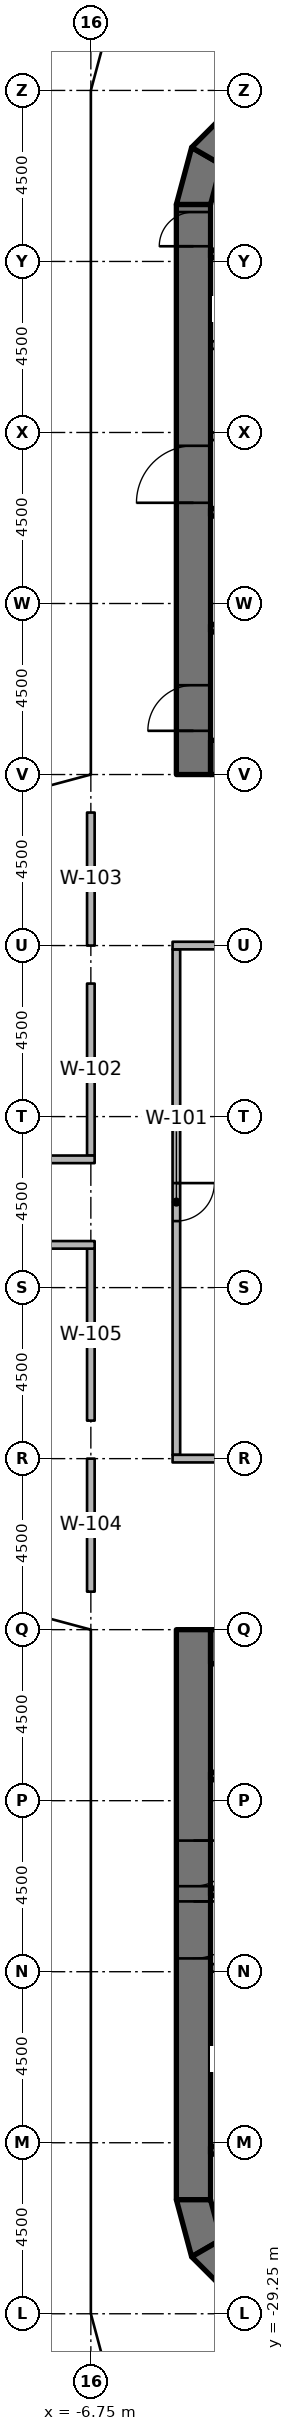
"""IFC4 building model, lengths in metres.
Left out: names, types, materials, properties, quantities, classifications, styles, units other than length and angle.
Written with IfcOpenShell. Run it as: python <this file> out.ifc"""

import sys

from ifc_helpers import new_model, si_unit, direction, frame, frame_2d, origin, origin_2d, place, context, subcontext, project, spatial, polyline, rectangle, outline, extrude, element, fill, save


model = new_model("IFC4")
c1 = context("Model", 3, precision=1e-05, world=origin(), true_north=direction((0.0, 1.0)))
c2 = subcontext(c1, "Body", "Model", "MODEL_VIEW")
j1 = project(units=[si_unit("LENGTHUNIT", "METRE"), si_unit("PLANEANGLEUNIT", "RADIAN")], contexts=[c1])
p1 = place(None, origin())
s1 = spatial("IfcSite", under=j1, at=p1, CompositionType="ELEMENT")
p2 = place(p1, origin())
s2 = spatial("IfcBuilding", under=s1, at=p2, CompositionType="ELEMENT")
p3 = place(p2, frame((0.0, 0.0, 27.0)))
s3 = spatial("IfcBuildingStorey", under=s2, at=p3, CompositionType="ELEMENT", Elevation=27.0)
for number, where, z_axis, x_axis in (
    (1, (-6.25, -26.9, 0.0), (0.0, 0.0, 1.0), (1.0, 0.0, 0.0)),
    (2, (-6.25, -24.65, 0.0), (0.0, 0.0, 1.0), (1.0, 0.0, 0.0)),
    (3, (-6.25, -20.25, 0.0), (0.0, 0.0, 1.0), (1.0, 0.0, 0.0)),
    (4, (-6.25, -15.75, 0.0), (0.0, 0.0, 1.0), (1.0, 0.0, 0.0)),
    (5, (-6.25, -10.75, 0.0), (0.0, 0.0, 1.0), (1.0, 0.0, 0.0)),
    (6, (-6.25, -6.25, 0.0), (0.0, 0.0, 1.0), (1.0, 0.0, 0.0)),
    (7, (-6.25, 6.25, 0.0), (0.0, 0.0, 1.0), (1.0, 0.0, 0.0)),
    (8, (-6.25, 10.75, 0.0), (0.0, 0.0, 1.0), (1.0, 0.0, 0.0)),
    (9, (-6.25, 15.75, 0.0), (0.0, 0.0, 1.0), (1.0, 0.0, 0.0)),
    (10, (-6.25, 20.25, 0.0), (0.0, 0.0, 1.0), (1.0, 0.0, 0.0)),
    (11, (-6.25, 24.65, 0.0), (0.0, 0.0, 1.0), (1.0, 0.0, 0.0)),
    (12, (-6.25, 26.7, 0.0), (0.0, 0.0, 1.0), (1.0, 0.0, 0.0)),
):
    element("IfcColumn", number, at=place(p3, frame(where, z_axis=z_axis, x_axis=x_axis)), inside=s3, PredefinedType="COLUMN", context=c2, shape_type="SweptSolid", body=[
        extrude(rectangle(XDim=1.0, YDim=1.0, at=origin_2d()), origin(), (0.0, 0.0, 1.0), 4.05),
    ])
p4 = place(p3, frame((-4.05, 11.25, 0.0), z_axis=(0.0, 0.0, 1.0), x_axis=(0.0, 1.0, 0.0)))
e13 = element("IfcWall", 13, at=p4, inside=s3, PredefinedType="SHEAR", context=c2, shape_type="SweptSolid", body=[
    extrude(rectangle(XDim=15.0, YDim=0.9, at=frame_2d((7.5, 0.0))), origin(), (0.0, 0.0, 1.0), 4.2),
])
p5 = place(p4, frame((7.15, 0.0, 0.0)))
e14 = element("IfcOpeningElement", 14, at=p5, cuts=e13, PredefinedType="OPENING", context=c2, shape_type="SweptSolid", body=[
    extrude(rectangle(XDim=1.5, YDim=2.3, at=frame_2d((0.75, 1.15))), frame((0.0, 0.46, 0.0), z_axis=(0.0, -1.0, 0.0), x_axis=(1.0, 0.0, 0.0)), (0.0, 0.0, 1.0), 0.92),
])
p6 = place(p4, frame((13.9, 0.0, 0.0)))
e15 = element("IfcOpeningElement", 15, at=p6, cuts=e13, PredefinedType="OPENING", context=c2, shape_type="SweptSolid", body=[
    extrude(rectangle(XDim=0.9, YDim=2.1, at=frame_2d((0.45, 1.05))), frame((0.0, 0.46, 0.0), z_axis=(0.0, -1.0, 0.0), x_axis=(1.0, 0.0, 0.0)), (0.0, 0.0, 1.0), 0.92),
])
p7 = place(p4, frame((1.15, 0.0, 0.0)))
e16 = element("IfcOpeningElement", 16, at=p7, cuts=e13, PredefinedType="OPENING", context=c2, shape_type="SweptSolid", body=[
    extrude(rectangle(XDim=1.2, YDim=2.1, at=frame_2d((0.6, 1.05))), frame((0.0, 0.46, 0.0), z_axis=(0.0, -1.0, 0.0), x_axis=(1.0, 0.0, 0.0)), (0.0, 0.0, 1.0), 0.92),
])
p8 = place(p3, frame((-3.6, 11.7, 0.0), z_axis=(0.0, 0.0, 1.0), x_axis=(1.0, 0.0, 0.0)))
e17 = element("IfcWall", 17, at=p8, inside=s3, PredefinedType="SHEAR", context=c2, shape_type="SweptSolid", body=[
    extrude(rectangle(XDim=7.2, YDim=0.9, at=frame_2d((3.6, 0.0))), origin(), (0.0, 0.0, 1.0), 4.2),
])
p9 = place(p3, origin())
e18 = element("IfcWall", 18, at=p9, inside=s3, PredefinedType="SHEAR", context=c2, shape_type="SweptSolid", body=[
    extrude(outline(polyline([(-4.5, 26.25), (-4.098, 27.75), (-3.319, 27.3), (-3.6, 26.25), (-4.5, 26.25)])), origin(), (0.0, 0.0, 1.0), 4.2),
])
p10 = place(p3, origin())
e19 = element("IfcWall", 19, at=p10, inside=s3, PredefinedType="SHEAR", context=c2, shape_type="SweptSolid", body=[
    extrude(outline(polyline([(-4.098, 27.75), (-3.0, 28.848), (-2.55, 28.069), (-3.319, 27.3), (-4.098, 27.75)])), origin(), (0.0, 0.0, 1.0), 4.2),
])
p11 = place(p3, frame((-4.05, -11.25, 0.0), z_axis=(0.0, 0.0, 1.0), x_axis=(0.0, -1.0, 0.0)))
e20 = element("IfcWall", 20, at=p11, inside=s3, PredefinedType="SHEAR", context=c2, shape_type="SweptSolid", body=[
    extrude(rectangle(XDim=15.0, YDim=0.9, at=frame_2d((7.5, 0.0))), origin(), (0.0, 0.0, 1.0), 4.2),
])
p12 = place(p11, frame((7.15, 0.0, 0.0)))
e21 = element("IfcOpeningElement", 21, at=p12, cuts=e20, PredefinedType="OPENING", context=c2, shape_type="SweptSolid", body=[
    extrude(rectangle(XDim=1.5, YDim=2.3, at=frame_2d((0.75, 1.15))), frame((0.0, 0.46, 0.0), z_axis=(0.0, -1.0, 0.0), x_axis=(1.0, 0.0, 0.0)), (0.0, 0.0, 1.0), 0.92),
])
p13 = place(p11, frame((5.55, 0.0, 0.0)))
e22 = element("IfcOpeningElement", 22, at=p13, cuts=e20, PredefinedType="OPENING", context=c2, shape_type="SweptSolid", body=[
    extrude(rectangle(XDim=1.2, YDim=2.1, at=frame_2d((0.6, 1.05))), frame((0.0, 0.46, 0.0), z_axis=(0.0, -1.0, 0.0), x_axis=(1.0, 0.0, 0.0)), (0.0, 0.0, 1.0), 0.92),
])
p14 = place(p3, frame((-3.6, -11.7, 0.0), z_axis=(0.0, 0.0, 1.0), x_axis=(1.0, 0.0, 0.0)))
e23 = element("IfcWall", 23, at=p14, inside=s3, PredefinedType="SHEAR", context=c2, shape_type="SweptSolid", body=[
    extrude(rectangle(XDim=7.2, YDim=0.9, at=frame_2d((3.6, 0.0))), origin(), (0.0, 0.0, 1.0), 4.2),
])
p15 = place(p3, origin())
e24 = element("IfcWall", 24, at=p15, inside=s3, PredefinedType="SHEAR", context=c2, shape_type="SweptSolid", body=[
    extrude(outline(polyline([(-4.5, -26.25), (-4.098, -27.75), (-3.319, -27.3), (-3.6, -26.25), (-4.5, -26.25)])), origin(), (0.0, 0.0, 1.0), 4.2),
])
p16 = place(p3, origin())
e25 = element("IfcWall", 25, at=p16, inside=s3, PredefinedType="SHEAR", context=c2, shape_type="SweptSolid", body=[
    extrude(outline(polyline([(-4.098, -27.75), (-3.0, -28.848), (-2.55, -28.069), (-3.319, -27.3), (-4.098, -27.75)])), origin(), (0.0, 0.0, 1.0), 4.2),
])
for number, where, z_axis, x_axis in (
    (26, (-3.6, 24.95, 0.0), (0.0, 0.0, 1.0), (1.0, 0.0, 0.0)),
    (27, (-3.6, 18.15, 0.0), (0.0, 0.0, 1.0), (1.0, 0.0, 0.0)),
    (28, (-3.6, 15.1, 0.0), (0.0, 0.0, 1.0), (1.0, 0.0, 0.0)),
):
    element("IfcWall", number, at=place(p3, frame(where, z_axis=z_axis, x_axis=x_axis)), inside=s3, PredefinedType="SHEAR", context=c2, shape_type="SweptSolid", body=[
        extrude(rectangle(XDim=7.2, YDim=0.2, at=frame_2d((3.6, 0.0))), origin(), (0.0, 0.0, 1.0), 4.05),
    ])
p17 = place(p3, frame((-3.6, 20.15, 0.0), z_axis=(0.0, 0.0, 1.0), x_axis=(1.0, 0.0, 0.0)))
e29 = element("IfcWall", 29, at=p17, inside=s3, PredefinedType="PARTITIONING", context=c2, shape_type="SweptSolid", body=[
    extrude(rectangle(XDim=2.7, YDim=0.2, at=frame_2d((1.35, 0.0))), origin(), (0.0, 0.0, 1.0), 4.05),
])
p18 = place(p3, frame((-3.6, 22.55, 0.0), z_axis=(0.0, 0.0, 1.0), x_axis=(1.0, 0.0, 0.0)))
e30 = element("IfcWall", 30, at=p18, inside=s3, PredefinedType="PARTITIONING", context=c2, shape_type="SweptSolid", body=[
    extrude(rectangle(XDim=2.5, YDim=0.2, at=frame_2d((1.25, 0.0))), origin(), (0.0, 0.0, 1.0), 4.05),
])
for number, where, z_axis, x_axis in (
    (31, (3.6, -24.95, 0.0), (0.0, 0.0, 1.0), (-1.0, 0.0, 0.0)),
    (32, (3.6, -18.15, 0.0), (0.0, 0.0, 1.0), (-1.0, 0.0, 0.0)),
    (33, (3.6, -15.1, 0.0), (0.0, 0.0, 1.0), (-1.0, 0.0, 0.0)),
):
    element("IfcWall", number, at=place(p3, frame(where, z_axis=z_axis, x_axis=x_axis)), inside=s3, PredefinedType="SHEAR", context=c2, shape_type="SweptSolid", body=[
        extrude(rectangle(XDim=7.2, YDim=0.2, at=frame_2d((3.6, 0.0))), origin(), (0.0, 0.0, 1.0), 4.05),
    ])
p19 = place(p3, frame((-0.9, -20.15, 0.0), z_axis=(0.0, 0.0, 1.0), x_axis=(-1.0, 0.0, 0.0)))
e34 = element("IfcWall", 34, at=p19, inside=s3, PredefinedType="PARTITIONING", context=c2, shape_type="SweptSolid", body=[
    extrude(rectangle(XDim=2.7, YDim=0.2, at=frame_2d((1.35, 0.0))), origin(), (0.0, 0.0, 1.0), 4.05),
])
p20 = place(p3, frame((-1.1, -22.55, 0.0), z_axis=(0.0, 0.0, 1.0), x_axis=(-1.0, 0.0, 0.0)))
e35 = element("IfcWall", 35, at=p20, inside=s3, PredefinedType="PARTITIONING", context=c2, shape_type="SweptSolid", body=[
    extrude(rectangle(XDim=2.5, YDim=0.2, at=frame_2d((1.25, 0.0))), origin(), (0.0, 0.0, 1.0), 4.05),
])
p21 = place(p3, frame((-4.5, 6.65, 0.0), z_axis=(0.0, 0.0, 1.0), x_axis=(0.0, -1.0, 0.0)))
e36 = element("IfcWall", 36, at=p21, inside=s3, PredefinedType="PARTITIONING", context=c2, shape_type="SweptSolid", body=[
    extrude(rectangle(XDim=13.3, YDim=0.2, at=frame_2d((6.65, 0.0))), origin(), (0.0, 0.0, 1.0), 3.131),
])
p22 = place(p21, frame((6.15, 0.0, 0.0)))
e37 = element("IfcOpeningElement", 37, at=p22, cuts=e36, PredefinedType="OPENING", context=c2, shape_type="SweptSolid", body=[
    extrude(rectangle(XDim=1.0, YDim=2.1, at=frame_2d((0.5, 1.05))), frame((0.0, 0.11, 0.0), z_axis=(0.0, -1.0, 0.0), x_axis=(1.0, 0.0, 0.0)), (0.0, 0.0, 1.0), 0.22),
])
p23 = place(p3, frame((-6.75, 1.225, 0.0), z_axis=(0.0, 0.0, 1.0), x_axis=(0.0, 1.0, 0.0)))
e38 = element("IfcWall", 38, at=p23, inside=s3, PredefinedType="PARTITIONING", context=c2, shape_type="SweptSolid", body=[
    extrude(rectangle(XDim=4.525, YDim=0.2, at=frame_2d((2.262, 0.0))), origin(), (0.0, 0.0, 1.0), 3.131),
])
for number, where, z_axis, x_axis in (
    (39, (-6.75, 6.75, 0.0), (0.0, 0.0, 1.0), (0.0, 1.0, 0.0)),
    (40, (-6.75, -10.25, 0.0), (0.0, 0.0, 1.0), (0.0, 1.0, 0.0)),
):
    element("IfcWall", number, at=place(p3, frame(where, z_axis=z_axis, x_axis=x_axis)), inside=s3, PredefinedType="PARTITIONING", context=c2, shape_type="SweptSolid", body=[
        extrude(rectangle(XDim=3.5, YDim=0.2, at=frame_2d((1.75, 0.0))), origin(), (0.0, 0.0, 1.0), 3.131),
    ])
p24 = place(p3, frame((-6.75, -5.75, 0.0), z_axis=(0.0, 0.0, 1.0), x_axis=(0.0, 1.0, 0.0)))
e41 = element("IfcWall", 41, at=p24, inside=s3, PredefinedType="PARTITIONING", context=c2, shape_type="SweptSolid", body=[
    extrude(rectangle(XDim=4.525, YDim=0.2, at=frame_2d((2.262, 0.0))), origin(), (0.0, 0.0, 1.0), 3.131),
])
for number, where, z_axis, x_axis in (
    (42, (-4.6, 6.75, 0.0), (0.0, 0.0, 1.0), (1.0, 0.0, 0.0)),
    (43, (-4.6, -6.75, 0.0), (0.0, 0.0, 1.0), (1.0, 0.0, 0.0)),
):
    element("IfcWall", number, at=place(p3, frame(where, z_axis=z_axis, x_axis=x_axis)), inside=s3, PredefinedType="PARTITIONING", context=c2, shape_type="SweptSolid", body=[
        extrude(rectangle(XDim=4.7, YDim=0.2, at=frame_2d((2.35, 0.0))), origin(), (0.0, 0.0, 1.0), 3.131),
    ])
p25 = place(p3, frame((-11.35, 1.125, 0.0), z_axis=(0.0, 0.0, 1.0), x_axis=(1.0, 0.0, 0.0)))
e44 = element("IfcWall", 44, at=p25, inside=s3, PredefinedType="PARTITIONING", context=c2, shape_type="SweptSolid", body=[
    extrude(rectangle(XDim=4.7, YDim=0.2, at=frame_2d((2.35, 0.0))), origin(), (0.0, 0.0, 1.0), 3.131),
])
p26 = place(p25, frame((1.85, 0.0, 0.0)))
e45 = element("IfcOpeningElement", 45, at=p26, cuts=e44, PredefinedType="OPENING", context=c2, shape_type="SweptSolid", body=[
    extrude(rectangle(XDim=1.0, YDim=2.1, at=frame_2d((0.5, 1.05))), frame((0.0, 0.11, 0.0), z_axis=(0.0, -1.0, 0.0), x_axis=(1.0, 0.0, 0.0)), (0.0, 0.0, 1.0), 0.22),
])
p27 = place(p3, frame((-6.65, -1.125, 0.0), z_axis=(0.0, 0.0, 1.0), x_axis=(-1.0, 0.0, 0.0)))
e46 = element("IfcWall", 46, at=p27, inside=s3, PredefinedType="PARTITIONING", context=c2, shape_type="SweptSolid", body=[
    extrude(rectangle(XDim=4.7, YDim=0.2, at=frame_2d((2.35, 0.0))), origin(), (0.0, 0.0, 1.0), 3.131),
])
p28 = place(p27, frame((1.85, 0.0, 0.0)))
e47 = element("IfcOpeningElement", 47, at=p28, cuts=e46, PredefinedType="OPENING", context=c2, shape_type="SweptSolid", body=[
    extrude(rectangle(XDim=1.0, YDim=2.1, at=frame_2d((0.5, 1.05))), frame((0.0, 0.11, 0.0), z_axis=(0.0, -1.0, 0.0), x_axis=(1.0, 0.0, 0.0)), (0.0, 0.0, 1.0), 0.22),
])
p29 = place(p5, origin())
e48 = element("IfcDoor", 48, at=p29, inside=s3, OperationType="DOUBLE_DOOR_SINGLE_SWING", PredefinedType="DOOR", context=c2, shape_type="SweptSolid", body=[
    extrude(rectangle(XDim=1.5, YDim=2.3, at=frame_2d((0.75, 1.15))), frame((0.0, 0.025, 0.0), z_axis=(0.0, -1.0, 0.0), x_axis=(1.0, 0.0, 0.0)), (0.0, 0.0, 1.0), 0.05),
])
fill(e14, e48)
p30 = place(p6, origin())
e49 = element("IfcDoor", 49, at=p30, inside=s3, OperationType="SINGLE_SWING_LEFT", PredefinedType="DOOR", context=c2, shape_type="SweptSolid", body=[
    extrude(rectangle(XDim=0.9, YDim=2.1, at=frame_2d((0.45, 1.05))), frame((0.0, 0.025, 0.0), z_axis=(0.0, -1.0, 0.0), x_axis=(1.0, 0.0, 0.0)), (0.0, 0.0, 1.0), 0.05),
])
fill(e15, e49)
p31 = place(p7, origin())
e50 = element("IfcDoor", 50, at=p31, inside=s3, OperationType="SINGLE_SWING_LEFT", PredefinedType="DOOR", context=c2, shape_type="SweptSolid", body=[
    extrude(rectangle(XDim=1.2, YDim=2.1, at=frame_2d((0.6, 1.05))), frame((0.0, 0.025, 0.0), z_axis=(0.0, -1.0, 0.0), x_axis=(1.0, 0.0, 0.0)), (0.0, 0.0, 1.0), 0.05),
])
fill(e16, e50)
p32 = place(p12, origin())
e51 = element("IfcDoor", 51, at=p32, inside=s3, OperationType="DOUBLE_DOOR_SINGLE_SWING", PredefinedType="DOOR", context=c2, shape_type="SweptSolid", body=[
    extrude(rectangle(XDim=1.5, YDim=2.3, at=frame_2d((0.75, 1.15))), frame((0.0, 0.025, 0.0), z_axis=(0.0, -1.0, 0.0), x_axis=(1.0, 0.0, 0.0)), (0.0, 0.0, 1.0), 0.05),
])
fill(e21, e51)
p33 = place(p13, origin())
e52 = element("IfcDoor", 52, at=p33, inside=s3, OperationType="SINGLE_SWING_RIGHT", PredefinedType="DOOR", context=c2, shape_type="SweptSolid", body=[
    extrude(rectangle(XDim=1.2, YDim=2.1, at=frame_2d((0.6, 1.05))), frame((0.0, 0.025, 0.0), z_axis=(0.0, -1.0, 0.0), x_axis=(1.0, 0.0, 0.0)), (0.0, 0.0, 1.0), 0.05),
])
fill(e22, e52)
p34 = place(p22, origin())
e53 = element("IfcDoor", 53, at=p34, inside=s3, OperationType="SINGLE_SWING_RIGHT", PredefinedType="DOOR", context=c2, shape_type="SweptSolid", body=[
    extrude(rectangle(XDim=1.0, YDim=2.1, at=frame_2d((0.5, 1.05))), frame((0.0, 0.025, 0.0), z_axis=(0.0, -1.0, 0.0), x_axis=(1.0, 0.0, 0.0)), (0.0, 0.0, 1.0), 0.05),
])
fill(e37, e53)
save(model, sys.argv[1])
